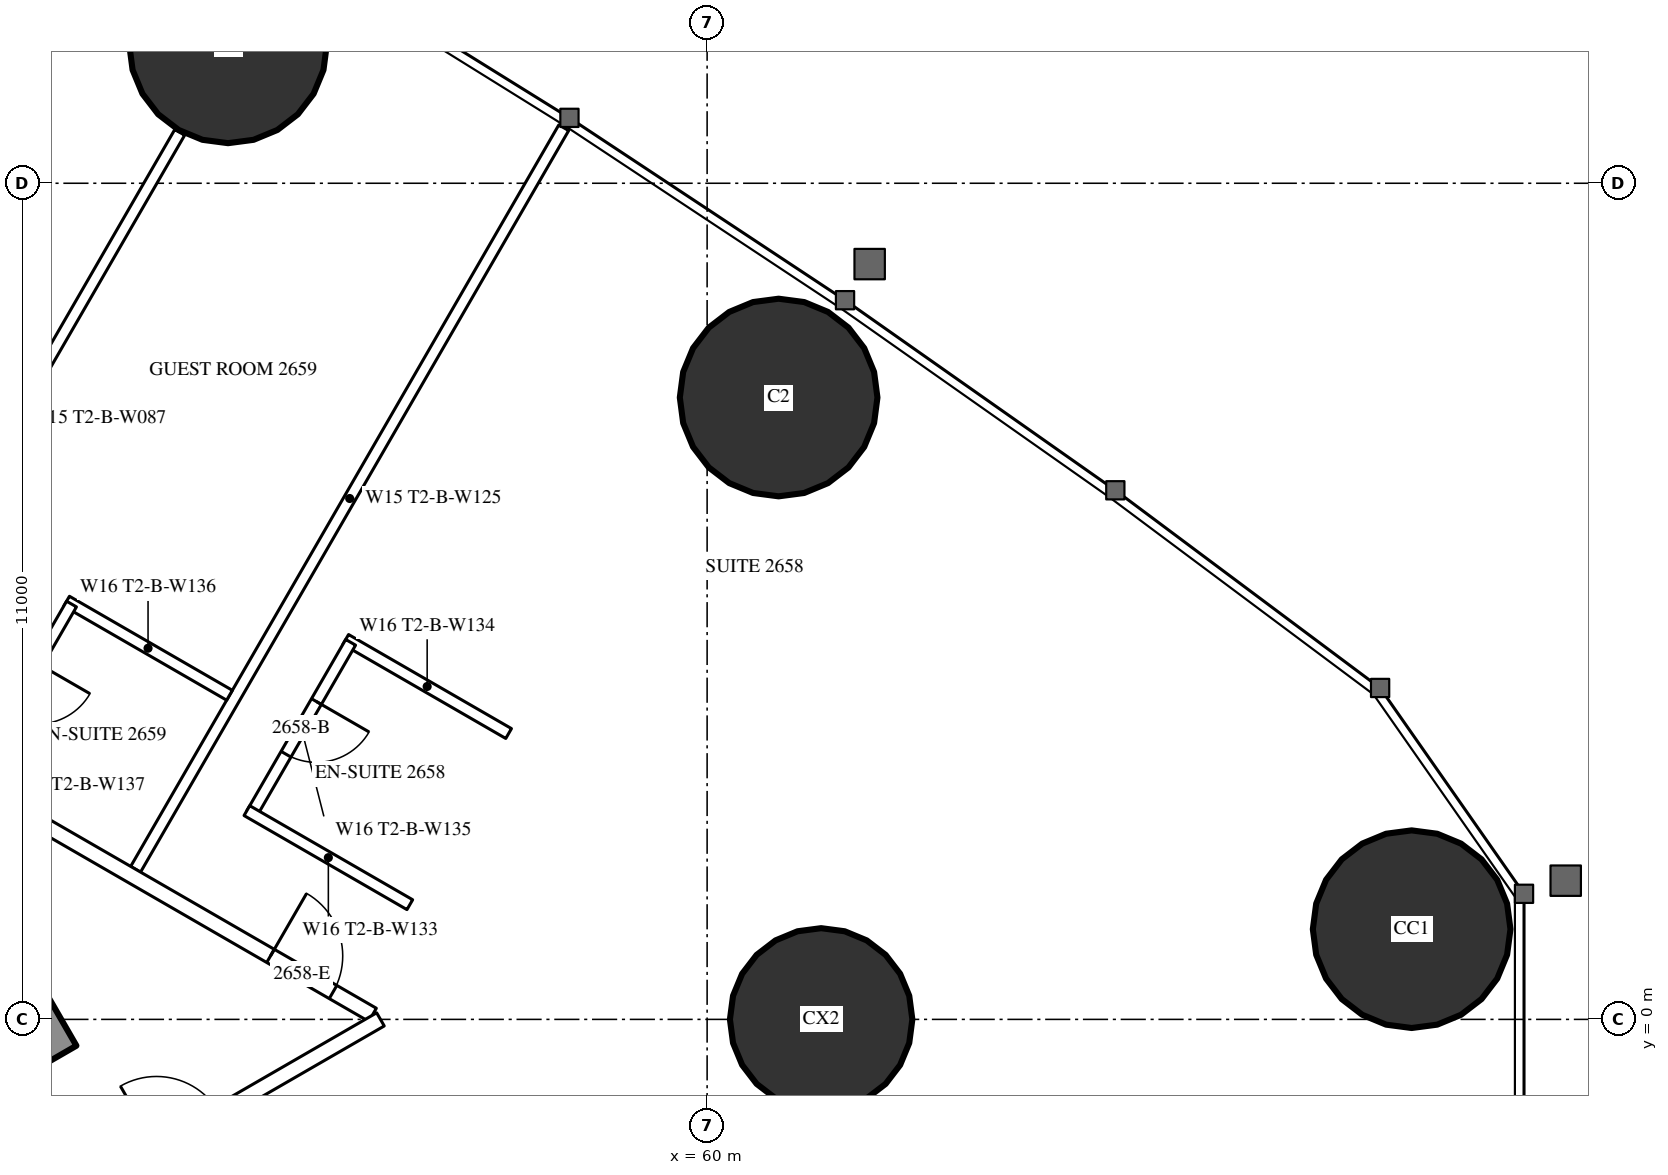
"""IFC4 building model, lengths in metres.
Left out: names, types, materials, properties, quantities, classifications, styles, units other than length and angle.
Written with IfcOpenShell. Run it as: python <this file> out.ifc"""

import sys

from ifc_helpers import new_model, si_unit, direction, frame, frame_2d, origin, origin_2d, place, context, subcontext, project, spatial, rectangle, circle, hollow_circle, extrude, element, fill, save


model = new_model("IFC4")
c1 = context("Model", 3, precision=1e-05, world=origin(), true_north=direction((0.0, 1.0)))
c2 = subcontext(c1, "Body", "Model", "MODEL_VIEW")
j1 = project(units=[si_unit("LENGTHUNIT", "METRE"), si_unit("PLANEANGLEUNIT", "RADIAN")], contexts=[c1])
p1 = place(None, origin())
s1 = spatial("IfcSite", under=j1, at=p1, CompositionType="ELEMENT")
p2 = place(p1, origin())
s2 = spatial("IfcBuilding", under=s1, at=p2, CompositionType="ELEMENT")
p3 = place(p2, frame((0.0, 0.0, 101.1)))
s3 = spatial("IfcBuildingStorey", under=s2, at=p3, CompositionType="ELEMENT", Elevation=101.1)
for number, where, z_axis, x_axis in (
    (1, (69.269, 1.187, 0.0), (0.0, 0.0, 1.0), (1.0, 0.0, 0.0)),
    (2, (60.941, 8.181, 0.0), (0.0, 0.0, 1.0), (1.0, 0.0, 0.0)),
    (3, (53.697, 12.827, 0.0), (0.0, 0.0, 1.0), (1.0, 0.0, 0.0)),
):
    element("IfcColumn", number, at=place(p3, frame(where, z_axis=z_axis, x_axis=x_axis)), inside=s3, PredefinedType="COLUMN", context=c2, shape_type="SweptSolid", body=[
        extrude(hollow_circle(Radius=1.3, WallThickness=0.1, at=origin_2d()), origin(), (0.0, 0.0, 1.0), 3.5),
    ])
p4 = place(p3, frame((61.5, 0.0, 0.0), z_axis=(0.0, 0.0, 1.0), x_axis=(1.0, 0.0, 0.0)))
e4 = element("IfcColumn", 4, at=p4, inside=s3, PredefinedType="COLUMN", context=c2, shape_type="SweptSolid", body=[
    extrude(circle(Radius=1.2, at=origin_2d()), origin(), (0.0, 0.0, 1.0), 3.5),
])
p5 = place(p3, frame((27.2, -13.8, 0.0), z_axis=(0.0, 0.0, 1.0), x_axis=(0.866027159892, 0.499996958321, 0.0)))
e5 = element("IfcWall", 5, at=p5, inside=s3, PredefinedType="SHEAR", context=c2, shape_type="SweptSolid", body=[
    extrude(rectangle(XDim=27.947, YDim=1.2, at=frame_2d((13.973, 0.0))), origin(), (0.0, 0.0, 1.0), 3.5),
])
p6 = place(p5, frame((4.6, 0.0, 0.0)))
e6 = element("IfcOpeningElement", 6, at=p6, cuts=e5, PredefinedType="OPENING", context=c2, shape_type="SweptSolid", body=[
    extrude(rectangle(XDim=1.0, YDim=2.2, at=frame_2d((0.5, 1.1))), frame((0.0, 0.61, 0.0), z_axis=(0.0, -1.0, 0.0), x_axis=(1.0, 0.0, 0.0)), (0.0, 0.0, 1.0), 1.22),
])
p7 = place(p5, frame((13.395, 0.0, 0.0)))
e7 = element("IfcOpeningElement", 7, at=p7, cuts=e5, PredefinedType="OPENING", context=c2, shape_type="SweptSolid", body=[
    extrude(rectangle(XDim=1.8, YDim=2.2, at=frame_2d((0.9, 1.1))), frame((0.0, 0.61, 0.0), z_axis=(0.0, -1.0, 0.0), x_axis=(1.0, 0.0, 0.0)), (0.0, 0.0, 1.0), 1.22),
])
p8 = place(p3, frame((48.719, 4.147, 0.0), z_axis=(0.0, 0.0, 1.0), x_axis=(0.499993328235, 0.866029255696, 0.0)))
e8 = element("IfcWall", 8, at=p8, inside=s3, PredefinedType="PARTITIONING", context=c2, shape_type="SweptSolid", body=[
    extrude(rectangle(XDim=8.686, YDim=0.15, at=frame_2d((4.343, 0.0))), origin(), (0.0, 0.0, 1.0), 2.2),
])
p9 = place(p3, frame((52.481, 1.975, 0.0), z_axis=(0.0, 0.0, 1.0), x_axis=(0.500003867771, 0.866023170714, 0.0)))
e9 = element("IfcWall", 9, at=p9, inside=s3, PredefinedType="PARTITIONING", context=c2, shape_type="SweptSolid", body=[
    extrude(rectangle(XDim=11.265, YDim=0.15, at=frame_2d((5.632, 0.0))), origin(), (0.0, 0.0, 1.0), 3.25),
])
p10 = place(p3, frame((36.834, 10.894, 0.0), z_axis=(0.0, 0.0, 1.0), x_axis=(0.866028157229, -0.499995230863, 0.0)))
e10 = element("IfcWall", 10, at=p10, inside=s3, PredefinedType="PARTITIONING", context=c2, shape_type="SweptSolid", body=[
    extrude(rectangle(XDim=21.667, YDim=0.2, at=frame_2d((10.833, 0.0))), origin(), (0.0, 0.0, 1.0), 3.25),
])
p11 = place(p10, frame((20.117, 0.0, 0.0)))
e11 = element("IfcOpeningElement", 11, at=p11, cuts=e10, PredefinedType="OPENING", context=c2, shape_type="SweptSolid", body=[
    extrude(rectangle(XDim=0.95, YDim=2.2, at=frame_2d((0.475, 1.1))), frame((0.0, 0.11, 0.0), z_axis=(0.0, -1.0, 0.0), x_axis=(1.0, 0.0, 0.0)), (0.0, 0.0, 1.0), 0.22),
])
p12 = place(p10, frame((14.335, 0.0, 0.0)))
e12 = element("IfcOpeningElement", 12, at=p12, cuts=e10, PredefinedType="OPENING", context=c2, shape_type="SweptSolid", body=[
    extrude(rectangle(XDim=0.95, YDim=2.2, at=frame_2d((0.475, 1.1))), frame((0.0, 0.11, 0.0), z_axis=(0.0, -1.0, 0.0), x_axis=(1.0, 0.0, 0.0)), (0.0, 0.0, 1.0), 0.22),
])
p13 = place(p10, frame((9.693, 0.0, 0.0)))
e13 = element("IfcOpeningElement", 13, at=p13, cuts=e10, PredefinedType="OPENING", context=c2, shape_type="SweptSolid", body=[
    extrude(rectangle(XDim=0.95, YDim=2.2, at=frame_2d((0.475, 1.1))), frame((0.0, 0.11, 0.0), z_axis=(0.0, -1.0, 0.0), x_axis=(1.0, 0.0, 0.0)), (0.0, 0.0, 1.0), 0.22),
])
p14 = place(p10, frame((2.95, 0.0, 0.0)))
e14 = element("IfcOpeningElement", 14, at=p14, cuts=e10, PredefinedType="OPENING", context=c2, shape_type="SweptSolid", body=[
    extrude(rectangle(XDim=0.95, YDim=2.2, at=frame_2d((0.475, 1.1))), frame((0.0, 0.11, 0.0), z_axis=(0.0, -1.0, 0.0), x_axis=(1.0, 0.0, 0.0)), (0.0, 0.0, 1.0), 0.22),
])
p15 = place(p3, frame((48.69, -4.048, 0.0), z_axis=(0.0, 0.0, 1.0), x_axis=(0.866026410209, 0.499998256818, 0.0)))
e15 = element("IfcWall", 15, at=p15, inside=s3, PredefinedType="PARTITIONING", context=c2, shape_type="SweptSolid", body=[
    extrude(rectangle(XDim=8.097, YDim=0.2, at=frame_2d((4.048, 0.0))), origin(), (0.0, 0.0, 1.0), 3.25),
])
p16 = place(p15, frame((0.6, 0.0, 0.0)))
e16 = element("IfcOpeningElement", 16, at=p16, cuts=e15, PredefinedType="OPENING", context=c2, shape_type="SweptSolid", body=[
    extrude(rectangle(XDim=0.95, YDim=2.2, at=frame_2d((0.475, 1.1))), frame((0.0, 0.11, 0.0), z_axis=(0.0, -1.0, 0.0), x_axis=(1.0, 0.0, 0.0)), (0.0, 0.0, 1.0), 0.22),
])
p17 = place(p15, frame((4.695, 0.0, 0.0)))
e17 = element("IfcOpeningElement", 17, at=p17, cuts=e15, PredefinedType="OPENING", context=c2, shape_type="SweptSolid", body=[
    extrude(rectangle(XDim=0.95, YDim=2.2, at=frame_2d((0.475, 1.1))), frame((0.0, 0.11, 0.0), z_axis=(0.0, -1.0, 0.0), x_axis=(1.0, 0.0, 0.0)), (0.0, 0.0, 1.0), 0.22),
])
p18 = place(p3, frame((55.245, 4.998, 0.0), z_axis=(0.0, 0.0, 1.0), x_axis=(0.866006523861, -0.500032699561, 0.0)))
e18 = element("IfcWall", 18, at=p18, inside=s3, PredefinedType="PARTITIONING", context=c2, shape_type="SweptSolid", body=[
    extrude(rectangle(XDim=2.475, YDim=0.15, at=frame_2d((1.237, 0.0))), origin(), (0.0, 0.0, 1.0), 3.25),
])
p19 = place(p3, frame((54.01, 2.709, 0.0), z_axis=(0.0, 0.0, 1.0), x_axis=(0.500006934395, 0.866021400173, 0.0)))
e19 = element("IfcWall", 19, at=p19, inside=s3, PredefinedType="PARTITIONING", context=c2, shape_type="SweptSolid", body=[
    extrude(rectangle(XDim=2.6, YDim=0.15, at=frame_2d((1.3, 0.0))), origin(), (0.0, 0.0, 1.0), 3.25),
])
p20 = place(p19, frame((0.9, 0.0, 0.0)))
e20 = element("IfcOpeningElement", 20, at=p20, cuts=e19, PredefinedType="OPENING", context=c2, shape_type="SweptSolid", body=[
    extrude(rectangle(XDim=0.8, YDim=2.2, at=frame_2d((0.4, 1.1))), frame((0.0, 0.085, 0.0), z_axis=(0.0, -1.0, 0.0), x_axis=(1.0, 0.0, 0.0)), (0.0, 0.0, 1.0), 0.17),
])
p21 = place(p3, frame((53.945, 2.747, 0.0), z_axis=(0.0, 0.0, 1.0), x_axis=(0.866031185235, -0.4999899861, 0.0)))
e21 = element("IfcWall", 21, at=p21, inside=s3, PredefinedType="PARTITIONING", context=c2, shape_type="SweptSolid", body=[
    extrude(rectangle(XDim=2.475, YDim=0.15, at=frame_2d((1.238, 0.0))), origin(), (0.0, 0.0, 1.0), 3.25),
])
p22 = place(p3, frame((51.573, 5.502, 0.0), z_axis=(0.0, 0.0, 1.0), x_axis=(0.866006523861, -0.500032699561, 0.0)))
e22 = element("IfcWall", 22, at=p22, inside=s3, PredefinedType="PARTITIONING", context=c2, shape_type="SweptSolid", body=[
    extrude(rectangle(XDim=2.475, YDim=0.15, at=frame_2d((1.237, 0.0))), origin(), (0.0, 0.0, 1.0), 3.25),
])
p23 = place(p3, frame((50.338, 3.213, 0.0), z_axis=(0.0, 0.0, 1.0), x_axis=(0.500047596559, 0.865997922154, 0.0)))
e23 = element("IfcWall", 23, at=p23, inside=s3, PredefinedType="PARTITIONING", context=c2, shape_type="SweptSolid", body=[
    extrude(rectangle(XDim=2.6, YDim=0.15, at=frame_2d((1.3, 0.0))), origin(), (0.0, 0.0, 1.0), 3.25),
])
p24 = place(p23, frame((0.9, 0.0, 0.0)))
e24 = element("IfcOpeningElement", 24, at=p24, cuts=e23, PredefinedType="OPENING", context=c2, shape_type="SweptSolid", body=[
    extrude(rectangle(XDim=0.8, YDim=2.2, at=frame_2d((0.4, 1.1))), frame((0.0, 0.085, 0.0), z_axis=(0.0, -1.0, 0.0), x_axis=(1.0, 0.0, 0.0)), (0.0, 0.0, 1.0), 0.17),
])
p25 = place(p20, origin())
e25 = element("IfcDoor", 25, at=p25, inside=s3, OperationType="SINGLE_SWING_RIGHT", PredefinedType="DOOR", context=c2, shape_type="SweptSolid", body=[
    extrude(rectangle(XDim=0.8, YDim=2.2, at=frame_2d((0.4, 1.1))), frame((0.0, 0.025, 0.0), z_axis=(0.0, -1.0, 0.0), x_axis=(1.0, 0.0, 0.0)), (0.0, 0.0, 1.0), 0.05),
])
fill(e20, e25)
p26 = place(p11, origin())
e26 = element("IfcDoor", 26, at=p26, inside=s3, OperationType="SINGLE_SWING_LEFT", PredefinedType="DOOR", context=c2, shape_type="SweptSolid", body=[
    extrude(rectangle(XDim=0.95, YDim=2.2, at=frame_2d((0.475, 1.1))), frame((0.0, 0.025, 0.0), z_axis=(0.0, -1.0, 0.0), x_axis=(1.0, 0.0, 0.0)), (0.0, 0.0, 1.0), 0.05),
])
fill(e11, e26)
save(model, sys.argv[1])
